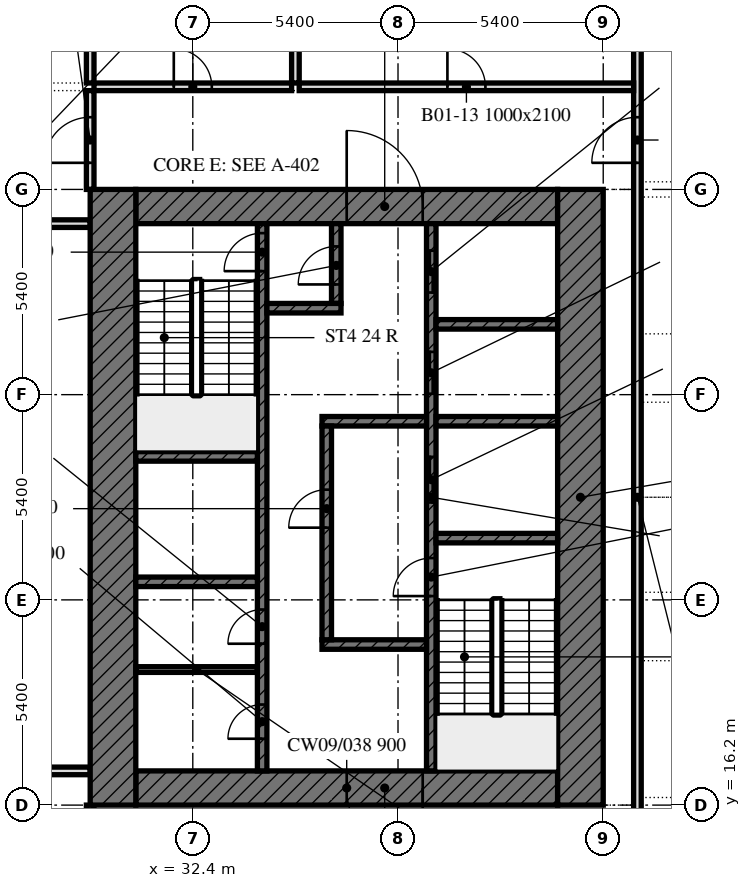
"""IFC4 building model, lengths in metres.
Left out: names, types, materials, properties, quantities, classifications, styles, units other than length and angle.
Written with IfcOpenShell. Run it as: python <this file> out.ifc"""

import sys

from ifc_helpers import new_model, si_unit, direction, frame, frame_2d, origin, place, context, subcontext, project, spatial, rectangle, extrude, element, fill, save


model = new_model("IFC4")
c1 = context("Model", 3, precision=1e-05, world=origin(), true_north=direction((0.0, 1.0)))
c2 = subcontext(c1, "Body", "Model", "MODEL_VIEW")
j1 = project(units=[si_unit("LENGTHUNIT", "METRE"), si_unit("PLANEANGLEUNIT", "RADIAN")], contexts=[c1])
p1 = place(None, origin())
s1 = spatial("IfcSite", under=j1, at=p1, CompositionType="ELEMENT")
p2 = place(p1, origin())
s2 = spatial("IfcBuilding", under=s1, at=p2, CompositionType="ELEMENT")
p3 = place(p2, frame((0.0, 0.0, -4.5)))
s3 = spatial("IfcBuildingStorey", under=s2, at=p3, CompositionType="ELEMENT", Elevation=-4.5)
p4 = place(p3, frame((44.1, 4.4, 0.0), z_axis=(0.0, 0.0, 1.0), x_axis=(0.0, 1.0, 0.0)))
e1 = element("IfcWall", 1, at=p4, inside=s3, PredefinedType="PARTITIONING", context=c2, shape_type="SweptSolid", body=[
    extrude(rectangle(XDim=39.8, YDim=0.2, at=frame_2d((19.9, 0.0))), origin(), (0.0, 0.0, 1.0), 4.0),
])
p5 = place(p4, frame((9.9, 0.0, 0.0)))
e2 = element("IfcOpeningElement", 2, at=p5, cuts=e1, PredefinedType="OPENING", context=c2, shape_type="SweptSolid", body=[
    extrude(rectangle(XDim=1.2, YDim=2.1, at=frame_2d((0.6, 1.05))), frame((0.0, 0.11, 0.0), z_axis=(0.0, -1.0, 0.0), x_axis=(1.0, 0.0, 0.0)), (0.0, 0.0, 1.0), 0.22),
])
p6 = place(p4, frame((28.7, 0.0, 0.0)))
e3 = element("IfcOpeningElement", 3, at=p6, cuts=e1, PredefinedType="OPENING", context=c2, shape_type="SweptSolid", body=[
    extrude(rectangle(XDim=1.2, YDim=2.1, at=frame_2d((0.6, 1.05))), frame((0.0, 0.11, 0.0), z_axis=(0.0, -1.0, 0.0), x_axis=(1.0, 0.0, 0.0)), (0.0, 0.0, 1.0), 0.22),
])
for number, where, z_axis, x_axis in (
    (4, (29.7, 35.2, 0.0), (0.0, 0.0, 1.0), (0.0, 1.0, 0.0)),
    (5, (35.1, 35.2, 0.0), (0.0, 0.0, 1.0), (0.0, 1.0, 0.0)),
):
    element("IfcWall", number, at=place(p3, frame(where, z_axis=z_axis, x_axis=x_axis)), inside=s3, PredefinedType="PARTITIONING", context=c2, shape_type="SweptSolid", body=[
        extrude(rectangle(XDim=8.8, YDim=0.2, at=frame_2d((4.4, 0.0))), origin(), (0.0, 0.0, 1.0), 4.0),
    ])
p7 = place(p3, frame((29.8, 35.1, 0.0), z_axis=(0.0, 0.0, 1.0), x_axis=(1.0, 0.0, 0.0)))
e6 = element("IfcWall", 6, at=p7, inside=s3, PredefinedType="PARTITIONING", context=c2, shape_type="SweptSolid", body=[
    extrude(rectangle(XDim=5.2, YDim=0.2, at=frame_2d((2.6, 0.0))), origin(), (0.0, 0.0, 1.0), 4.0),
])
p8 = place(p7, frame((2.1, 0.0, 0.0)))
e7 = element("IfcOpeningElement", 7, at=p8, cuts=e6, PredefinedType="OPENING", context=c2, shape_type="SweptSolid", body=[
    extrude(rectangle(XDim=1.0, YDim=2.1, at=frame_2d((0.5, 1.05))), frame((0.0, 0.11, 0.0), z_axis=(0.0, -1.0, 0.0), x_axis=(1.0, 0.0, 0.0)), (0.0, 0.0, 1.0), 0.22),
])
p9 = place(p3, frame((35.2, 35.1, 0.0), z_axis=(0.0, 0.0, 1.0), x_axis=(1.0, 0.0, 0.0)))
e8 = element("IfcWall", 8, at=p9, inside=s3, PredefinedType="PARTITIONING", context=c2, shape_type="SweptSolid", body=[
    extrude(rectangle(XDim=8.8, YDim=0.2, at=frame_2d((4.4, 0.0))), origin(), (0.0, 0.0, 1.0), 4.0),
])
p10 = place(p9, frame((3.9, 0.0, 0.0)))
e9 = element("IfcOpeningElement", 9, at=p10, cuts=e8, PredefinedType="OPENING", context=c2, shape_type="SweptSolid", body=[
    extrude(rectangle(XDim=1.0, YDim=2.1, at=frame_2d((0.5, 1.05))), frame((0.0, 0.11, 0.0), z_axis=(0.0, -1.0, 0.0), x_axis=(1.0, 0.0, 0.0)), (0.0, 0.0, 1.0), 0.22),
])
p11 = place(p3, frame((29.7, 13.6, 0.0), z_axis=(0.0, 0.0, 1.0), x_axis=(0.0, 1.0, 0.0)))
e10 = element("IfcWall", 10, at=p11, inside=s3, PredefinedType="PARTITIONING", context=c2, shape_type="SweptSolid", body=[
    extrude(rectangle(XDim=2.6, YDim=0.2, at=frame_2d((1.3, 0.0))), origin(), (0.0, 0.0, 1.0), 4.0),
])
p12 = place(p11, frame((0.7, 0.0, 0.0)))
e11 = element("IfcOpeningElement", 11, at=p12, cuts=e10, PredefinedType="OPENING", context=c2, shape_type="SweptSolid", body=[
    extrude(rectangle(XDim=1.2, YDim=2.1, at=frame_2d((0.6, 1.05))), frame((0.0, 0.11, 0.0), z_axis=(0.0, -1.0, 0.0), x_axis=(1.0, 0.0, 0.0)), (0.0, 0.0, 1.0), 0.22),
])
p13 = place(p3, frame((29.7, 32.4, 0.0), z_axis=(0.0, 0.0, 1.0), x_axis=(0.0, 1.0, 0.0)))
e12 = element("IfcWall", 12, at=p13, inside=s3, PredefinedType="PARTITIONING", context=c2, shape_type="SweptSolid", body=[
    extrude(rectangle(XDim=2.6, YDim=0.2, at=frame_2d((1.3, 0.0))), origin(), (0.0, 0.0, 1.0), 4.0),
])
p14 = place(p13, frame((0.7, 0.0, 0.0)))
e13 = element("IfcOpeningElement", 13, at=p14, cuts=e12, PredefinedType="OPENING", context=c2, shape_type="SweptSolid", body=[
    extrude(rectangle(XDim=1.2, YDim=2.1, at=frame_2d((0.6, 1.05))), frame((0.0, 0.11, 0.0), z_axis=(0.0, -1.0, 0.0), x_axis=(1.0, 0.0, 0.0)), (0.0, 0.0, 1.0), 0.22),
])
p15 = place(p3, frame((18.9, 17.1, 0.0), z_axis=(0.0, 0.0, 1.0), x_axis=(1.0, 0.0, 0.0)))
e14 = element("IfcWall", 14, at=p15, inside=s3, PredefinedType="PARTITIONING", context=c2, shape_type="SweptSolid", body=[
    extrude(rectangle(XDim=10.8, YDim=0.2, at=frame_2d((5.4, 0.0))), origin(), (0.0, 0.0, 1.0), 4.0),
])
p16 = place(p15, frame((4.9, 0.0, 0.0)))
e15 = element("IfcOpeningElement", 15, at=p16, cuts=e14, PredefinedType="OPENING", context=c2, shape_type="SweptSolid", body=[
    extrude(rectangle(XDim=1.0, YDim=2.1, at=frame_2d((0.5, 1.05))), frame((0.0, 0.11, 0.0), z_axis=(0.0, -1.0, 0.0), x_axis=(1.0, 0.0, 0.0)), (0.0, 0.0, 1.0), 0.22),
])
p17 = place(p3, frame((18.9, 31.5, 0.0), z_axis=(0.0, 0.0, 1.0), x_axis=(1.0, 0.0, 0.0)))
e16 = element("IfcWall", 16, at=p17, inside=s3, PredefinedType="PARTITIONING", context=c2, shape_type="SweptSolid", body=[
    extrude(rectangle(XDim=10.8, YDim=0.2, at=frame_2d((5.4, 0.0))), origin(), (0.0, 0.0, 1.0), 4.0),
])
p18 = place(p3, frame((42.0, 16.65, 0.0), z_axis=(0.0, 0.0, 1.0), x_axis=(-1.0, 0.0, 0.0)))
e17 = element("IfcWall", 17, at=p18, inside=s3, PredefinedType="SOLIDWALL", context=c2, shape_type="SweptSolid", body=[
    extrude(rectangle(XDim=11.1, YDim=0.9, at=frame_2d((5.55, 0.0))), origin(), (0.0, 0.0, 1.0), 4.0),
])
p19 = place(p18, frame((3.55, 0.0, 0.0)))
e18 = element("IfcOpeningElement", 18, at=p19, cuts=e17, PredefinedType="OPENING", context=c2, shape_type="SweptSolid", body=[
    extrude(rectangle(XDim=2.0, YDim=2.4, at=frame_2d((1.0, 1.2))), frame((0.0, 0.45, 0.0), z_axis=(0.0, -1.0, 0.0), x_axis=(1.0, 0.0, 0.0)), (0.0, 0.0, 1.0), 0.9),
])
p20 = place(p3, frame((30.9, 31.95, 0.0), z_axis=(0.0, 0.0, 1.0), x_axis=(1.0, 0.0, 0.0)))
e19 = element("IfcWall", 19, at=p20, inside=s3, PredefinedType="SOLIDWALL", context=c2, shape_type="SweptSolid", body=[
    extrude(rectangle(XDim=11.1, YDim=0.9, at=frame_2d((5.55, 0.0))), origin(), (0.0, 0.0, 1.0), 4.0),
])
p21 = place(p20, frame((5.55, 0.0, 0.0)))
e20 = element("IfcOpeningElement", 20, at=p21, cuts=e19, PredefinedType="OPENING", context=c2, shape_type="SweptSolid", body=[
    extrude(rectangle(XDim=2.0, YDim=2.4, at=frame_2d((1.0, 1.2))), frame((0.0, 0.45, 0.0), z_axis=(0.0, -1.0, 0.0), x_axis=(1.0, 0.0, 0.0)), (0.0, 0.0, 1.0), 0.9),
])
for number, where, z_axis, x_axis in (
    (21, (42.6, 32.4, 0.0), (0.0, 0.0, 1.0), (0.0, -1.0, 0.0)),
    (22, (30.3, 16.2, 0.0), (0.0, 0.0, 1.0), (0.0, 1.0, 0.0)),
):
    element("IfcWall", number, at=place(p3, frame(where, z_axis=z_axis, x_axis=x_axis)), inside=s3, PredefinedType="SOLIDWALL", context=c2, shape_type="SweptSolid", body=[
        extrude(rectangle(XDim=16.2, YDim=1.2, at=frame_2d((8.1, 0.0))), origin(), (0.0, 0.0, 1.0), 4.0),
    ])
p22 = place(p3, frame((38.675, 17.1, 0.0), z_axis=(0.0, 0.0, 1.0), x_axis=(0.0, 1.0, 0.0)))
e23 = element("IfcWall", 23, at=p22, inside=s3, PredefinedType="SOLIDWALL", context=c2, shape_type="SweptSolid", body=[
    extrude(rectangle(XDim=14.4, YDim=0.25, at=frame_2d((7.2, 0.0))), origin(), (0.0, 0.0, 1.0), 4.0),
])
p23 = place(p22, frame((4.6, 0.0, 0.0)))
e24 = element("IfcOpeningElement", 24, at=p23, cuts=e23, PredefinedType="OPENING", context=c2, shape_type="SweptSolid", body=[
    extrude(rectangle(XDim=1.0, YDim=2.1, at=frame_2d((0.5, 1.05))), frame((0.0, 0.125, 0.0), z_axis=(0.0, -1.0, 0.0), x_axis=(1.0, 0.0, 0.0)), (0.0, 0.0, 1.0), 0.25),
])
p24 = place(p22, frame((7.062, 0.0, 0.0)))
e25 = element("IfcOpeningElement", 25, at=p24, cuts=e23, PredefinedType="OPENING", context=c2, shape_type="SweptSolid", body=[
    extrude(rectangle(XDim=1.2, YDim=2.1, at=frame_2d((0.6, 1.05))), frame((0.0, 0.125, 0.0), z_axis=(0.0, -1.0, 0.0), x_axis=(1.0, 0.0, 0.0)), (0.0, 0.0, 1.0), 0.25),
])
p25 = place(p22, frame((9.925, 0.0, 0.0)))
e26 = element("IfcOpeningElement", 26, at=p25, cuts=e23, PredefinedType="OPENING", context=c2, shape_type="SweptSolid", body=[
    extrude(rectangle(XDim=1.1, YDim=2.1, at=frame_2d((0.55, 1.05))), frame((0.0, 0.125, 0.0), z_axis=(0.0, -1.0, 0.0), x_axis=(1.0, 0.0, 0.0)), (0.0, 0.0, 1.0), 0.25),
])
p26 = place(p22, frame((12.587, 0.0, 0.0)))
e27 = element("IfcOpeningElement", 27, at=p26, cuts=e23, PredefinedType="OPENING", context=c2, shape_type="SweptSolid", body=[
    extrude(rectangle(XDim=1.1, YDim=2.1, at=frame_2d((0.55, 1.05))), frame((0.0, 0.125, 0.0), z_axis=(0.0, -1.0, 0.0), x_axis=(1.0, 0.0, 0.0)), (0.0, 0.0, 1.0), 0.25),
])
p27 = place(p3, frame((34.225, 17.1, 0.0), z_axis=(0.0, 0.0, 1.0), x_axis=(0.0, 1.0, 0.0)))
e28 = element("IfcWall", 28, at=p27, inside=s3, PredefinedType="SOLIDWALL", context=c2, shape_type="SweptSolid", body=[
    extrude(rectangle(XDim=14.4, YDim=0.25, at=frame_2d((7.2, 0.0))), origin(), (0.0, 0.0, 1.0), 4.0),
])
p28 = place(p27, frame((13.15, 0.0, 0.0)))
e29 = element("IfcOpeningElement", 29, at=p28, cuts=e28, PredefinedType="OPENING", context=c2, shape_type="SweptSolid", body=[
    extrude(rectangle(XDim=1.0, YDim=2.1, at=frame_2d((0.5, 1.05))), frame((0.0, 0.125, 0.0), z_axis=(0.0, -1.0, 0.0), x_axis=(1.0, 0.0, 0.0)), (0.0, 0.0, 1.0), 0.25),
])
p29 = place(p27, frame((0.846, 0.0, 0.0)))
e30 = element("IfcOpeningElement", 30, at=p29, cuts=e28, PredefinedType="OPENING", context=c2, shape_type="SweptSolid", body=[
    extrude(rectangle(XDim=0.9, YDim=2.1, at=frame_2d((0.45, 1.05))), frame((0.0, 0.125, 0.0), z_axis=(0.0, -1.0, 0.0), x_axis=(1.0, 0.0, 0.0)), (0.0, 0.0, 1.0), 0.25),
])
p30 = place(p27, frame((3.346, 0.0, 0.0)))
e31 = element("IfcOpeningElement", 31, at=p30, cuts=e28, PredefinedType="OPENING", context=c2, shape_type="SweptSolid", body=[
    extrude(rectangle(XDim=0.9, YDim=2.1, at=frame_2d((0.45, 1.05))), frame((0.0, 0.125, 0.0), z_axis=(0.0, -1.0, 0.0), x_axis=(1.0, 0.0, 0.0)), (0.0, 0.0, 1.0), 0.25),
])
p31 = place(p3, frame((38.8, 23.225, 0.0), z_axis=(0.0, 0.0, 1.0), x_axis=(1.0, 0.0, 0.0)))
e32 = element("IfcWall", 32, at=p31, inside=s3, PredefinedType="SOLIDWALL", context=c2, shape_type="SweptSolid", body=[
    extrude(rectangle(XDim=3.2, YDim=0.25, at=frame_2d((1.6, 0.0))), origin(), (0.0, 0.0, 1.0), 4.0),
])
for number, where, z_axis, x_axis in (
    (33, (30.9, 25.375, 0.0), (0.0, 0.0, 1.0), (1.0, 0.0, 0.0)),
    (34, (30.9, 22.075, 0.0), (0.0, 0.0, 1.0), (1.0, 0.0, 0.0)),
):
    element("IfcWall", number, at=place(p3, frame(where, z_axis=z_axis, x_axis=x_axis)), inside=s3, PredefinedType="SOLIDWALL", context=c2, shape_type="SweptSolid", body=[
        extrude(rectangle(XDim=3.2, YDim=0.25, at=frame_2d((1.6, 0.0))), origin(), (0.0, 0.0, 1.0), 4.0),
    ])
p32 = place(p3, frame((38.8, 26.3, 0.0), z_axis=(0.0, 0.0, 1.0), x_axis=(1.0, 0.0, 0.0)))
e35 = element("IfcWall", 35, at=p32, inside=s3, PredefinedType="SOLIDWALL", context=c2, shape_type="SweptSolid", body=[
    extrude(rectangle(XDim=3.2, YDim=0.25, at=frame_2d((1.6, 0.0))), origin(), (0.0, 0.0, 1.0), 4.0),
])
for number, where, z_axis, x_axis in (
    (36, (35.8, 26.3, 0.0), (0.0, 0.0, 1.0), (1.0, 0.0, 0.0)),
    (37, (35.8, 20.425, 0.0), (0.0, 0.0, 1.0), (1.0, 0.0, 0.0)),
):
    element("IfcWall", number, at=place(p3, frame(where, z_axis=z_axis, x_axis=x_axis)), inside=s3, PredefinedType="SOLIDWALL", context=c2, shape_type="SweptSolid", body=[
        extrude(rectangle(XDim=2.75, YDim=0.25, at=frame_2d((1.375, 0.0))), origin(), (0.0, 0.0, 1.0), 4.0),
    ])
p33 = place(p3, frame((36.175, 29.4, 0.0), z_axis=(0.0, 0.0, 1.0), x_axis=(0.0, 1.0, 0.0)))
e38 = element("IfcWall", 38, at=p33, inside=s3, PredefinedType="SOLIDWALL", context=c2, shape_type="SweptSolid", body=[
    extrude(rectangle(XDim=2.1, YDim=0.25, at=frame_2d((1.05, 0.0))), origin(), (0.0, 0.0, 1.0), 4.0),
])
p34 = place(p33, frame((0.5, 0.0, 0.0)))
e39 = element("IfcOpeningElement", 39, at=p34, cuts=e38, PredefinedType="OPENING", context=c2, shape_type="SweptSolid", body=[
    extrude(rectangle(XDim=1.0, YDim=2.1, at=frame_2d((0.5, 1.05))), frame((0.0, 0.125, 0.0), z_axis=(0.0, -1.0, 0.0), x_axis=(1.0, 0.0, 0.0)), (0.0, 0.0, 1.0), 0.25),
])
p35 = place(p3, frame((34.35, 29.275, 0.0), z_axis=(0.0, 0.0, 1.0), x_axis=(1.0, 0.0, 0.0)))
e40 = element("IfcWall", 40, at=p35, inside=s3, PredefinedType="SOLIDWALL", context=c2, shape_type="SweptSolid", body=[
    extrude(rectangle(XDim=1.95, YDim=0.25, at=frame_2d((0.975, 0.0))), origin(), (0.0, 0.0, 1.0), 4.0),
])
p36 = place(p3, frame((35.925, 20.55, 0.0), z_axis=(0.0, 0.0, 1.0), x_axis=(0.0, 1.0, 0.0)))
e41 = element("IfcWall", 41, at=p36, inside=s3, PredefinedType="SOLIDWALL", context=c2, shape_type="SweptSolid", body=[
    extrude(rectangle(XDim=5.625, YDim=0.25, at=frame_2d((2.812, 0.0))), origin(), (0.0, 0.0, 1.0), 4.0),
])
p37 = place(p36, frame((2.95, 0.0, 0.0)))
e42 = element("IfcOpeningElement", 42, at=p37, cuts=e41, PredefinedType="OPENING", context=c2, shape_type="SweptSolid", body=[
    extrude(rectangle(XDim=1.0, YDim=2.1, at=frame_2d((0.5, 1.05))), frame((0.0, 0.125, 0.0), z_axis=(0.0, -1.0, 0.0), x_axis=(1.0, 0.0, 0.0)), (0.0, 0.0, 1.0), 0.25),
])
p38 = place(p3, frame((38.8, 28.85, 0.0), z_axis=(0.0, 0.0, 1.0), x_axis=(1.0, 0.0, 0.0)))
e43 = element("IfcWall", 43, at=p38, inside=s3, PredefinedType="SOLIDWALL", context=c2, shape_type="SweptSolid", body=[
    extrude(rectangle(XDim=3.2, YDim=0.25, at=frame_2d((1.6, 0.0))), origin(), (0.0, 0.0, 1.0), 4.0),
])
p39 = place(p3, frame((30.9, 19.767, 0.0), z_axis=(0.0, 0.0, 1.0), x_axis=(1.0, 0.0, 0.0)))
e44 = element("IfcWall", 44, at=p39, inside=s3, PredefinedType="PARTITIONING", context=c2, shape_type="SweptSolid", body=[
    extrude(rectangle(XDim=3.2, YDim=0.15, at=frame_2d((1.6, 0.0))), origin(), (0.0, 0.0, 1.0), 4.0),
])
p40 = place(p6, origin())
e45 = element("IfcDoor", 45, at=p40, inside=s3, OperationType="SINGLE_SWING_LEFT", PredefinedType="DOOR", context=c2, shape_type="SweptSolid", body=[
    extrude(rectangle(XDim=1.2, YDim=2.1, at=frame_2d((0.6, 1.05))), frame((0.0, 0.025, 0.0), z_axis=(0.0, -1.0, 0.0), x_axis=(1.0, 0.0, 0.0)), (0.0, 0.0, 1.0), 0.05),
])
fill(e3, e45)
p41 = place(p8, origin())
e46 = element("IfcDoor", 46, at=p41, inside=s3, OperationType="SINGLE_SWING_LEFT", PredefinedType="DOOR", context=c2, shape_type="SweptSolid", body=[
    extrude(rectangle(XDim=1.0, YDim=2.1, at=frame_2d((0.5, 1.05))), frame((0.0, 0.025, 0.0), z_axis=(0.0, -1.0, 0.0), x_axis=(1.0, 0.0, 0.0)), (0.0, 0.0, 1.0), 0.05),
])
fill(e7, e46)
p42 = place(p10, origin())
e47 = element("IfcDoor", 47, at=p42, inside=s3, OperationType="SINGLE_SWING_LEFT", PredefinedType="DOOR", context=c2, shape_type="SweptSolid", body=[
    extrude(rectangle(XDim=1.0, YDim=2.1, at=frame_2d((0.5, 1.05))), frame((0.0, 0.025, 0.0), z_axis=(0.0, -1.0, 0.0), x_axis=(1.0, 0.0, 0.0)), (0.0, 0.0, 1.0), 0.05),
])
fill(e9, e47)
p43 = place(p14, origin())
e48 = element("IfcDoor", 48, at=p43, inside=s3, OperationType="SINGLE_SWING_LEFT", PredefinedType="DOOR", context=c2, shape_type="SweptSolid", body=[
    extrude(rectangle(XDim=1.2, YDim=2.1, at=frame_2d((0.6, 1.05))), frame((0.0, 0.025, 0.0), z_axis=(0.0, -1.0, 0.0), x_axis=(1.0, 0.0, 0.0)), (0.0, 0.0, 1.0), 0.05),
])
fill(e13, e48)
p44 = place(p19, origin())
e49 = element("IfcDoor", 49, at=p44, inside=s3, OperationType="DOUBLE_DOOR_SINGLE_SWING", PredefinedType="DOOR", context=c2, shape_type="SweptSolid", body=[
    extrude(rectangle(XDim=2.0, YDim=2.4, at=frame_2d((1.0, 1.2))), frame((0.0, 0.025, 0.0), z_axis=(0.0, -1.0, 0.0), x_axis=(1.0, 0.0, 0.0)), (0.0, 0.0, 1.0), 0.05),
])
fill(e18, e49)
p45 = place(p21, origin())
e50 = element("IfcDoor", 50, at=p45, inside=s3, OperationType="DOUBLE_DOOR_SINGLE_SWING", PredefinedType="DOOR", context=c2, shape_type="SweptSolid", body=[
    extrude(rectangle(XDim=2.0, YDim=2.4, at=frame_2d((1.0, 1.2))), frame((0.0, 0.025, 0.0), z_axis=(0.0, -1.0, 0.0), x_axis=(1.0, 0.0, 0.0)), (0.0, 0.0, 1.0), 0.05),
])
fill(e20, e50)
p46 = place(p23, origin())
e51 = element("IfcDoor", 51, at=p46, inside=s3, OperationType="SINGLE_SWING_LEFT", PredefinedType="DOOR", context=c2, shape_type="SweptSolid", body=[
    extrude(rectangle(XDim=1.0, YDim=2.1, at=frame_2d((0.5, 1.05))), frame((0.0, 0.025, 0.0), z_axis=(0.0, -1.0, 0.0), x_axis=(1.0, 0.0, 0.0)), (0.0, 0.0, 1.0), 0.05),
])
fill(e24, e51)
p47 = place(p37, origin())
e52 = element("IfcDoor", 52, at=p47, inside=s3, OperationType="SINGLE_SWING_LEFT", PredefinedType="DOOR", context=c2, shape_type="SweptSolid", body=[
    extrude(rectangle(XDim=1.0, YDim=2.1, at=frame_2d((0.5, 1.05))), frame((0.0, 0.025, 0.0), z_axis=(0.0, -1.0, 0.0), x_axis=(1.0, 0.0, 0.0)), (0.0, 0.0, 1.0), 0.05),
])
fill(e42, e52)
p48 = place(p28, origin())
e53 = element("IfcDoor", 53, at=p48, inside=s3, OperationType="SINGLE_SWING_LEFT", PredefinedType="DOOR", context=c2, shape_type="SweptSolid", body=[
    extrude(rectangle(XDim=1.0, YDim=2.1, at=frame_2d((0.5, 1.05))), frame((0.0, 0.025, 0.0), z_axis=(0.0, -1.0, 0.0), x_axis=(1.0, 0.0, 0.0)), (0.0, 0.0, 1.0), 0.05),
])
fill(e29, e53)
p49 = place(p34, origin())
e54 = element("IfcDoor", 54, at=p49, inside=s3, OperationType="SINGLE_SWING_LEFT", PredefinedType="DOOR", context=c2, shape_type="SweptSolid", body=[
    extrude(rectangle(XDim=1.0, YDim=2.1, at=frame_2d((0.5, 1.05))), frame((0.0, 0.025, 0.0), z_axis=(0.0, -1.0, 0.0), x_axis=(1.0, 0.0, 0.0)), (0.0, 0.0, 1.0), 0.05),
])
fill(e39, e54)
p50 = place(p24, origin())
e55 = element("IfcDoor", 55, at=p50, inside=s3, OperationType="DOUBLE_DOOR_SLIDING", PredefinedType="DOOR", context=c2, shape_type="SweptSolid", body=[
    extrude(rectangle(XDim=1.2, YDim=2.1, at=frame_2d((0.6, 1.05))), frame((0.0, 0.025, 0.0), z_axis=(0.0, -1.0, 0.0), x_axis=(1.0, 0.0, 0.0)), (0.0, 0.0, 1.0), 0.05),
])
fill(e25, e55)
p51 = place(p25, origin())
e56 = element("IfcDoor", 56, at=p51, inside=s3, OperationType="DOUBLE_DOOR_SLIDING", PredefinedType="DOOR", context=c2, shape_type="SweptSolid", body=[
    extrude(rectangle(XDim=1.1, YDim=2.1, at=frame_2d((0.55, 1.05))), frame((0.0, 0.025, 0.0), z_axis=(0.0, -1.0, 0.0), x_axis=(1.0, 0.0, 0.0)), (0.0, 0.0, 1.0), 0.05),
])
fill(e26, e56)
p52 = place(p26, origin())
e57 = element("IfcDoor", 57, at=p52, inside=s3, OperationType="DOUBLE_DOOR_SLIDING", PredefinedType="DOOR", context=c2, shape_type="SweptSolid", body=[
    extrude(rectangle(XDim=1.1, YDim=2.1, at=frame_2d((0.55, 1.05))), frame((0.0, 0.025, 0.0), z_axis=(0.0, -1.0, 0.0), x_axis=(1.0, 0.0, 0.0)), (0.0, 0.0, 1.0), 0.05),
])
fill(e27, e57)
p53 = place(p29, origin())
e58 = element("IfcDoor", 58, at=p53, inside=s3, OperationType="SINGLE_SWING_LEFT", PredefinedType="DOOR", context=c2, shape_type="SweptSolid", body=[
    extrude(rectangle(XDim=0.9, YDim=2.1, at=frame_2d((0.45, 1.05))), frame((0.0, 0.025, 0.0), z_axis=(0.0, -1.0, 0.0), x_axis=(1.0, 0.0, 0.0)), (0.0, 0.0, 1.0), 0.05),
])
fill(e30, e58)
p54 = place(p30, origin())
e59 = element("IfcDoor", 59, at=p54, inside=s3, OperationType="SINGLE_SWING_LEFT", PredefinedType="DOOR", context=c2, shape_type="SweptSolid", body=[
    extrude(rectangle(XDim=0.9, YDim=2.1, at=frame_2d((0.45, 1.05))), frame((0.0, 0.025, 0.0), z_axis=(0.0, -1.0, 0.0), x_axis=(1.0, 0.0, 0.0)), (0.0, 0.0, 1.0), 0.05),
])
fill(e31, e59)
save(model, sys.argv[1])
